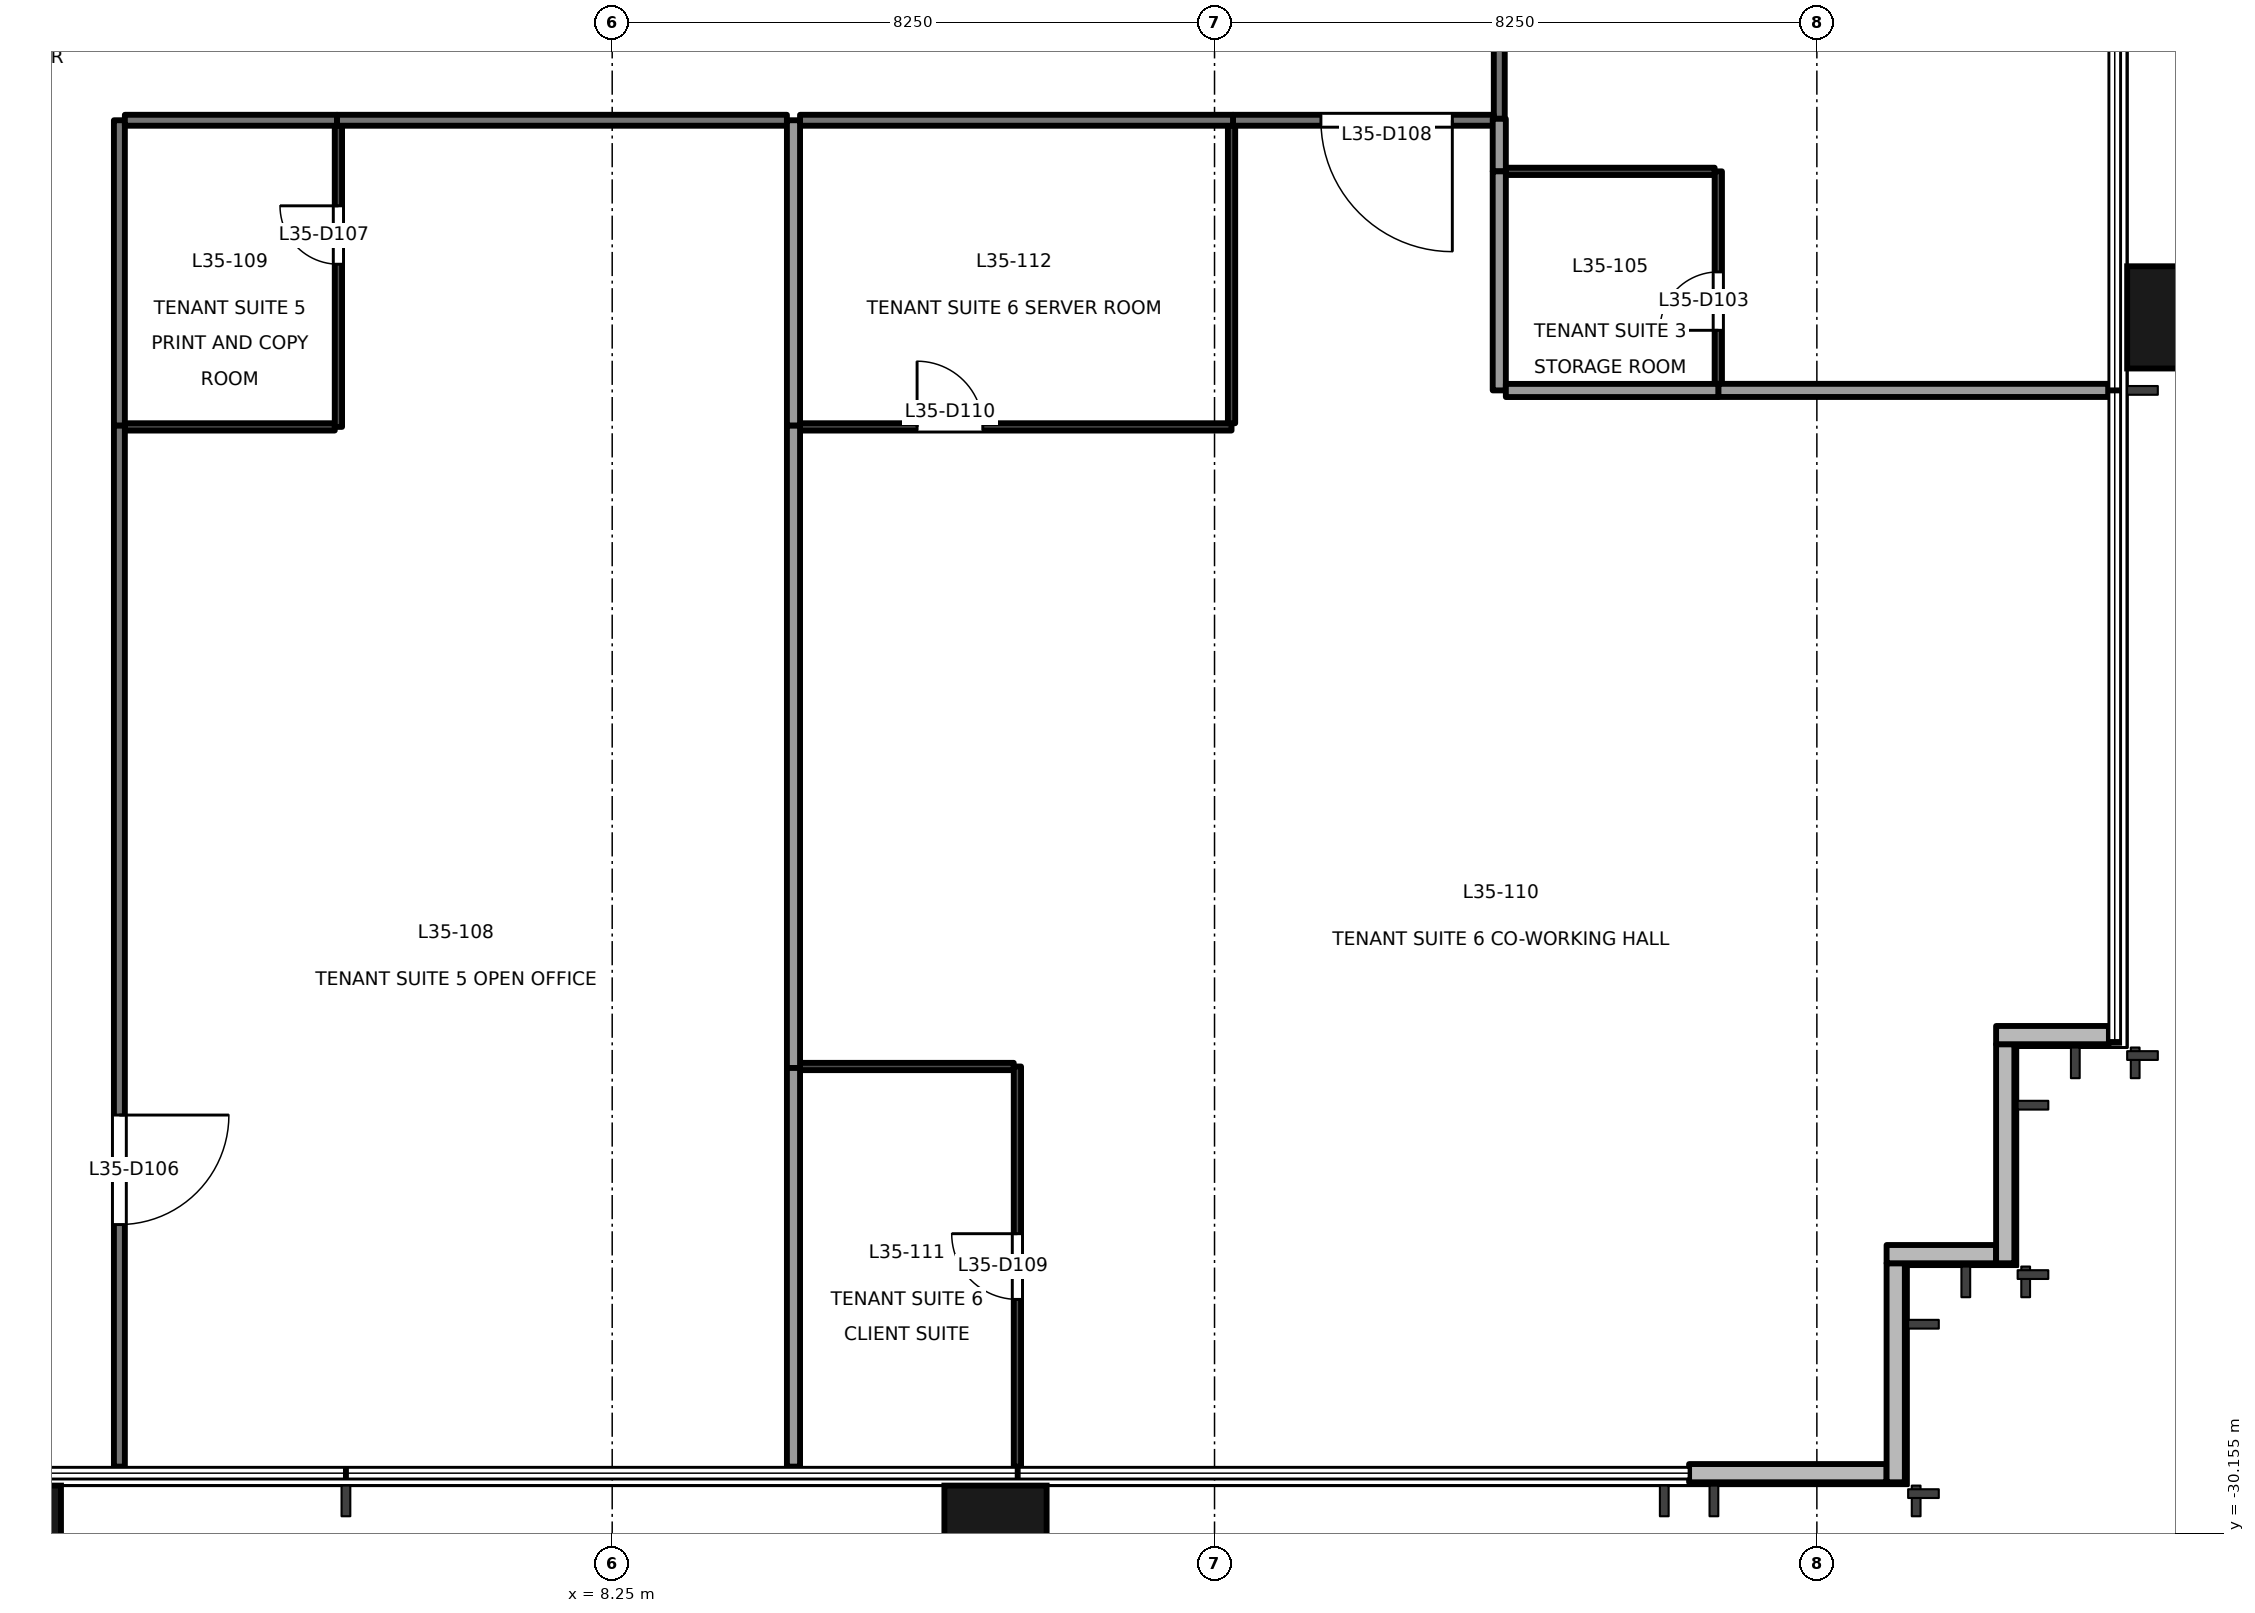
"""IFC4 building model, lengths in metres.
Left out: names, types, materials, properties, quantities, classifications, styles, units other than length and angle.
Written with IfcOpenShell. Run it as: python <this file> out.ifc"""

import sys

from ifc_helpers import new_model, si_unit, direction, frame, frame_2d, origin, origin_2d, place, context, subcontext, project, spatial, rectangle, extrude, element, fill, save


model = new_model("IFC4")
c1 = context("Model", 3, precision=1e-05, world=origin(), true_north=direction((0.0, 1.0)))
c2 = subcontext(c1, "Body", "Model", "MODEL_VIEW")
j1 = project(units=[si_unit("LENGTHUNIT", "METRE"), si_unit("PLANEANGLEUNIT", "RADIAN")], contexts=[c1])
p1 = place(None, origin())
s1 = spatial("IfcSite", under=j1, at=p1, CompositionType="ELEMENT")
p2 = place(p1, origin())
s2 = spatial("IfcBuilding", under=s1, at=p2, CompositionType="ELEMENT")
p3 = place(p2, frame((0.0, 0.0, 154.1)))
s3 = spatial("IfcBuildingStorey", under=s2, at=p3, CompositionType="ELEMENT", Elevation=154.1)
for number, where, z_axis, x_axis in (
    (1, (0.0, -30.4, -0.2), (0.0, 0.0, 1.0), (1.0, 0.0, 0.0)),
    (2, (13.5, -30.4, -0.2), (0.0, 0.0, 1.0), (1.0, 0.0, 0.0)),
    (3, (29.9, -13.5, -0.2), (0.0, 0.0, 1.0), (0.0, 1.0, 0.0)),
):
    element("IfcColumn", number, at=place(p3, frame(where, z_axis=z_axis, x_axis=x_axis)), inside=s3, PredefinedType="COLUMN", context=c2, shape_type="SweptSolid", body=[
        extrude(rectangle(XDim=1.4, YDim=1.8, at=origin_2d()), origin(), (0.0, 0.0, 1.0), 4.0),
    ])
p4 = place(p3, frame((23.0, -29.33, 0.0), z_axis=(0.0, 0.0, 1.0), x_axis=(1.0, 0.0, 0.0)))
e4 = element("IfcWall", 4, at=p4, inside=s3, PredefinedType="SOLIDWALL", context=c2, shape_type="SweptSolid", body=[
    extrude(rectangle(XDim=2.705, YDim=0.25, at=frame_2d((1.353, 0.0))), origin(), (0.0, 0.0, 1.0), 3.8),
])
p5 = place(p3, frame((25.83, -29.455, 0.0), z_axis=(0.0, 0.0, 1.0), x_axis=(0.0, 1.0, 0.0)))
e5 = element("IfcWall", 5, at=p5, inside=s3, PredefinedType="SOLIDWALL", context=c2, shape_type="SweptSolid", body=[
    extrude(rectangle(XDim=3.0, YDim=0.25, at=frame_2d((1.5, 0.0))), origin(), (0.0, 0.0, 1.0), 3.8),
])
p6 = place(p3, frame((25.705, -26.33, 0.0), z_axis=(0.0, 0.0, 1.0), x_axis=(1.0, 0.0, 0.0)))
e6 = element("IfcWall", 6, at=p6, inside=s3, PredefinedType="SOLIDWALL", context=c2, shape_type="SweptSolid", body=[
    extrude(rectangle(XDim=1.5, YDim=0.25, at=frame_2d((0.75, 0.0))), origin(), (0.0, 0.0, 1.0), 3.8),
])
p7 = place(p3, frame((27.33, -26.455, 0.0), z_axis=(0.0, 0.0, 1.0), x_axis=(0.0, 1.0, 0.0)))
e7 = element("IfcWall", 7, at=p7, inside=s3, PredefinedType="SOLIDWALL", context=c2, shape_type="SweptSolid", body=[
    extrude(rectangle(XDim=3.0, YDim=0.25, at=frame_2d((1.5, 0.0))), origin(), (0.0, 0.0, 1.0), 3.8),
])
p8 = place(p3, frame((27.205, -23.33, 0.0), z_axis=(0.0, 0.0, 1.0), x_axis=(1.0, 0.0, 0.0)))
e8 = element("IfcWall", 8, at=p8, inside=s3, PredefinedType="SOLIDWALL", context=c2, shape_type="SweptSolid", body=[
    extrude(rectangle(XDim=1.545, YDim=0.25, at=frame_2d((0.772, 0.0))), origin(), (0.0, 0.0, 1.0), 3.8),
])
p9 = place(p3, frame((20.4, -5.59, 0.0), z_axis=(0.0, 0.0, 1.0), x_axis=(0.0, -1.0, 0.0)))
e9 = element("IfcWall", 9, at=p9, inside=s3, PredefinedType="PARTITIONING", context=c2, shape_type="SweptSolid", body=[
    extrude(rectangle(XDim=5.19, YDim=0.15, at=frame_2d((2.595, 0.0))), origin(), (0.0, 0.0, 1.0), 3.8),
])
p10 = place(p9, frame((1.198, 0.0, 0.0)))
e10 = element("IfcOpeningElement", 10, at=p10, cuts=e9, PredefinedType="OPENING", context=c2, shape_type="SweptSolid", body=[
    extrude(rectangle(XDim=0.9, YDim=2.1, at=frame_2d((0.45, 1.05))), frame((0.0, 0.085, 0.0), z_axis=(0.0, -1.0, 0.0), x_axis=(1.0, 0.0, 0.0)), (0.0, 0.0, 1.0), 0.171),
])
p11 = place(p3, frame((1.5, -14.98, 0.0), z_axis=(0.0, 0.0, 1.0), x_axis=(0.0, -1.0, 0.0)))
e11 = element("IfcWall", 11, at=p11, inside=s3, PredefinedType="PARTITIONING", context=c2, shape_type="SweptSolid", body=[
    extrude(rectangle(XDim=14.26, YDim=0.15, at=frame_2d((7.13, 0.0))), origin(), (0.0, 0.0, 1.0), 3.8),
])
p12 = place(p11, frame((9.445, 0.0, 0.0)))
e12 = element("IfcOpeningElement", 12, at=p12, cuts=e11, PredefinedType="OPENING", context=c2, shape_type="SweptSolid", body=[
    extrude(rectangle(XDim=1.5, YDim=2.1, at=frame_2d((0.75, 1.05))), frame((0.0, 0.085, 0.0), z_axis=(0.0, -1.0, 0.0), x_axis=(1.0, 0.0, 0.0)), (0.0, 0.0, 1.0), 0.171),
])
p13 = place(p3, frame((10.643, -10.8, 0.0), z_axis=(0.0, 0.0, 1.0), x_axis=(-1.0, 0.0, 0.0)))
e13 = element("IfcWall", 13, at=p13, inside=s3, PredefinedType="PARTITIONING", context=c2, shape_type="SweptSolid", body=[
    extrude(rectangle(XDim=6.163, YDim=0.15, at=frame_2d((3.082, 0.0))), origin(), (0.0, 0.0, 1.0), 2.9),
])
p14 = place(p3, frame((1.5, -10.8, 0.0), z_axis=(0.0, 0.0, 1.0), x_axis=(0.0, -1.0, 0.0)))
e14 = element("IfcWall", 14, at=p14, inside=s3, PredefinedType="PARTITIONING", context=c2, shape_type="SweptSolid", body=[
    extrude(rectangle(XDim=4.18, YDim=0.15, at=frame_2d((2.09, 0.0))), origin(), (0.0, 0.0, 1.0), 3.8),
])
p15 = place(p3, frame((4.48, -10.8, 0.0), z_axis=(0.0, 0.0, 1.0), x_axis=(-1.0, 0.0, 0.0)))
e15 = element("IfcWall", 15, at=p15, inside=s3, PredefinedType="PARTITIONING", context=c2, shape_type="SweptSolid", body=[
    extrude(rectangle(XDim=2.905, YDim=0.15, at=frame_2d((1.453, 0.0))), origin(), (0.0, 0.0, 1.0), 2.9),
])
p16 = place(p3, frame((20.325, -10.8, 0.0), z_axis=(0.0, 0.0, 1.0), x_axis=(-1.0, 0.0, 0.0)))
e16 = element("IfcWall", 16, at=p16, inside=s3, PredefinedType="PARTITIONING", context=c2, shape_type="SweptSolid", body=[
    extrude(rectangle(XDim=3.572, YDim=0.15, at=frame_2d((1.786, 0.0))), origin(), (0.0, 0.0, 1.0), 3.8),
])
p17 = place(p16, frame((0.568, 0.0, 0.0)))
e17 = element("IfcOpeningElement", 17, at=p17, cuts=e16, PredefinedType="OPENING", context=c2, shape_type="SweptSolid", body=[
    extrude(rectangle(XDim=1.8, YDim=2.1, at=frame_2d((0.9, 1.05))), frame((0.0, 0.085, 0.0), z_axis=(0.0, -1.0, 0.0), x_axis=(1.0, 0.0, 0.0)), (0.0, 0.0, 1.0), 0.171),
])
p18 = place(p3, frame((16.753, -10.8, 0.0), z_axis=(0.0, 0.0, 1.0), x_axis=(-1.0, 0.0, 0.0)))
e18 = element("IfcWall", 18, at=p18, inside=s3, PredefinedType="PARTITIONING", context=c2, shape_type="SweptSolid", body=[
    extrude(rectangle(XDim=5.93, YDim=0.15, at=frame_2d((2.965, 0.0))), origin(), (0.0, 0.0, 1.0), 2.9),
])
p19 = place(p3, frame((23.35, -11.5, 0.0), z_axis=(0.0, 0.0, 1.0), x_axis=(-1.0, 0.0, 0.0)))
e19 = element("IfcWall", 19, at=p19, inside=s3, PredefinedType="PARTITIONING", context=c2, shape_type="SweptSolid", body=[
    extrude(rectangle(XDim=2.86, YDim=0.1, at=frame_2d((1.43, 0.0))), origin(), (0.0, 0.0, 1.0), 3.8),
])
p20 = place(p3, frame((23.4, -14.41, 0.0), z_axis=(0.0, 0.0, 1.0), x_axis=(0.0, 1.0, 0.0)))
e20 = element("IfcWall", 20, at=p20, inside=s3, PredefinedType="PARTITIONING", context=c2, shape_type="SweptSolid", body=[
    extrude(rectangle(XDim=2.91, YDim=0.1, at=frame_2d((1.455, 0.0))), origin(), (0.0, 0.0, 1.0), 3.8),
])
p21 = place(p20, frame((0.733, 0.0, 0.0)))
e21 = element("IfcOpeningElement", 21, at=p21, cuts=e20, PredefinedType="OPENING", context=c2, shape_type="SweptSolid", body=[
    extrude(rectangle(XDim=0.8, YDim=2.1, at=frame_2d((0.4, 1.05))), frame((0.0, 0.061, 0.0), z_axis=(0.0, -1.0, 0.0), x_axis=(1.0, 0.0, 0.0)), (0.0, 0.0, 1.0), 0.121),
])
p22 = place(p3, frame((20.4, -11.5, 0.0), z_axis=(0.0, 0.0, 1.0), x_axis=(0.0, 1.0, 0.0)))
e22 = element("IfcWall", 22, at=p22, inside=s3, PredefinedType="PARTITIONING", context=c2, shape_type="SweptSolid", body=[
    extrude(rectangle(XDim=0.72, YDim=0.18, at=frame_2d((0.36, 0.0))), origin(), (0.0, 0.0, 1.0), 3.8),
])
p23 = place(p3, frame((28.74, -14.5, 0.0), z_axis=(0.0, 0.0, 1.0), x_axis=(-1.0, 0.0, 0.0)))
e23 = element("IfcWall", 23, at=p23, inside=s3, PredefinedType="PARTITIONING", context=c2, shape_type="SweptSolid", body=[
    extrude(rectangle(XDim=5.34, YDim=0.18, at=frame_2d((2.67, 0.0))), origin(), (0.0, 0.0, 1.0), 3.8),
])
p24 = place(p3, frame((20.4, -14.5, 0.0), z_axis=(0.0, 0.0, 1.0), x_axis=(0.0, 1.0, 0.0)))
e24 = element("IfcWall", 24, at=p24, inside=s3, PredefinedType="PARTITIONING", context=c2, shape_type="SweptSolid", body=[
    extrude(rectangle(XDim=3.0, YDim=0.18, at=frame_2d((1.5, 0.0))), origin(), (0.0, 0.0, 1.0), 3.8),
])
p25 = place(p3, frame((23.4, -14.501, 0.0), z_axis=(0.0, 0.0, 1.0), x_axis=(-1.0, 0.0, 0.0)))
e25 = element("IfcWall", 25, at=p25, inside=s3, PredefinedType="PARTITIONING", context=c2, shape_type="SweptSolid", body=[
    extrude(rectangle(XDim=2.91, YDim=0.18, at=frame_2d((1.455, 0.0))), origin(), (0.0, 0.0, 1.0), 3.8),
])
p26 = place(p3, frame((1.575, -15.0, 0.0), z_axis=(0.0, 0.0, 1.0), x_axis=(1.0, 0.0, 0.0)))
e26 = element("IfcWall", 26, at=p26, inside=s3, PredefinedType="PARTITIONING", context=c2, shape_type="SweptSolid", body=[
    extrude(rectangle(XDim=2.875, YDim=0.1, at=frame_2d((1.438, 0.0))), origin(), (0.0, 0.0, 1.0), 2.9),
])
p27 = place(p3, frame((4.5, -15.0, 0.0), z_axis=(0.0, 0.0, 1.0), x_axis=(0.0, 1.0, 0.0)))
e27 = element("IfcWall", 27, at=p27, inside=s3, PredefinedType="PARTITIONING", context=c2, shape_type="SweptSolid", body=[
    extrude(rectangle(XDim=4.125, YDim=0.1, at=frame_2d((2.062, 0.0))), origin(), (0.0, 0.0, 1.0), 2.9),
])
p28 = place(p27, frame((2.228, 0.0, 0.0)))
e28 = element("IfcOpeningElement", 28, at=p28, cuts=e27, PredefinedType="OPENING", context=c2, shape_type="SweptSolid", body=[
    extrude(rectangle(XDim=0.8, YDim=2.1, at=frame_2d((0.4, 1.05))), frame((0.0, 0.061, 0.0), z_axis=(0.0, -1.0, 0.0), x_axis=(1.0, 0.0, 0.0)), (0.0, 0.0, 1.0), 0.121),
])
p29 = place(p3, frame((10.733, -14.98, 0.0), z_axis=(0.0, 0.0, 1.0), x_axis=(0.0, -1.0, 0.0)))
e29 = element("IfcWall", 29, at=p29, inside=s3, PredefinedType="PARTITIONING", context=c2, shape_type="SweptSolid", body=[
    extrude(rectangle(XDim=8.8, YDim=0.18, at=frame_2d((4.4, 0.0))), origin(), (0.0, 0.0, 1.0), 3.8),
])
p30 = place(p3, frame((10.733, -23.78, 0.0), z_axis=(0.0, 0.0, 1.0), x_axis=(0.0, -1.0, 0.0)))
e30 = element("IfcWall", 30, at=p30, inside=s3, PredefinedType="PARTITIONING", context=c2, shape_type="SweptSolid", body=[
    extrude(rectangle(XDim=5.46, YDim=0.18, at=frame_2d((2.73, 0.0))), origin(), (0.0, 0.0, 1.0), 3.8),
])
p31 = place(p3, frame((10.733, -10.8, 0.0), z_axis=(0.0, 0.0, 1.0), x_axis=(0.0, -1.0, 0.0)))
e31 = element("IfcWall", 31, at=p31, inside=s3, PredefinedType="PARTITIONING", context=c2, shape_type="SweptSolid", body=[
    extrude(rectangle(XDim=4.18, YDim=0.18, at=frame_2d((2.09, 0.0))), origin(), (0.0, 0.0, 1.0), 3.8),
])
p32 = place(p3, frame((13.75, -23.76, 0.0), z_axis=(0.0, 0.0, 1.0), x_axis=(-1.0, 0.0, 0.0)))
e32 = element("IfcWall", 32, at=p32, inside=s3, PredefinedType="PARTITIONING", context=c2, shape_type="SweptSolid", body=[
    extrude(rectangle(XDim=2.927, YDim=0.1, at=frame_2d((1.463, 0.0))), origin(), (0.0, 0.0, 1.0), 2.9),
])
p33 = place(p3, frame((13.8, -29.24, 0.0), z_axis=(0.0, 0.0, 1.0), x_axis=(0.0, 1.0, 0.0)))
e33 = element("IfcWall", 33, at=p33, inside=s3, PredefinedType="PARTITIONING", context=c2, shape_type="SweptSolid", body=[
    extrude(rectangle(XDim=5.48, YDim=0.1, at=frame_2d((2.74, 0.0))), origin(), (0.0, 0.0, 1.0), 3.8),
])
p34 = place(p33, frame((2.29, 0.0, 0.0)))
e34 = element("IfcOpeningElement", 34, at=p34, cuts=e33, PredefinedType="OPENING", context=c2, shape_type="SweptSolid", body=[
    extrude(rectangle(XDim=0.9, YDim=2.1, at=frame_2d((0.45, 1.05))), frame((0.0, 0.061, 0.0), z_axis=(0.0, -1.0, 0.0), x_axis=(1.0, 0.0, 0.0)), (0.0, 0.0, 1.0), 0.121),
])
p35 = place(p3, frame((10.823, -15.0, 0.0), z_axis=(0.0, 0.0, 1.0), x_axis=(1.0, 0.0, 0.0)))
e35 = element("IfcWall", 35, at=p35, inside=s3, PredefinedType="PARTITIONING", context=c2, shape_type="SweptSolid", body=[
    extrude(rectangle(XDim=5.91, YDim=0.1, at=frame_2d((2.955, 0.0))), origin(), (0.0, 0.0, 1.0), 2.9),
])
p36 = place(p35, frame((1.603, 0.0, 0.0)))
e36 = element("IfcOpeningElement", 36, at=p36, cuts=e35, PredefinedType="OPENING", context=c2, shape_type="SweptSolid", body=[
    extrude(rectangle(XDim=0.9, YDim=2.1, at=frame_2d((0.45, 1.05))), frame((0.0, 0.061, 0.0), z_axis=(0.0, -1.0, 0.0), x_axis=(1.0, 0.0, 0.0)), (0.0, 0.0, 1.0), 0.121),
])
p37 = place(p3, frame((16.733, -14.95, 0.0), z_axis=(0.0, 0.0, 1.0), x_axis=(0.0, 1.0, 0.0)))
e37 = element("IfcWall", 37, at=p37, inside=s3, PredefinedType="PARTITIONING", context=c2, shape_type="SweptSolid", body=[
    extrude(rectangle(XDim=4.075, YDim=0.1, at=frame_2d((2.038, 0.0))), origin(), (0.0, 0.0, 1.0), 3.8),
])
p38 = place(p21, origin())
e38 = element("IfcDoor", 38, at=p38, inside=s3, OperationType="SINGLE_SWING_LEFT", PredefinedType="DOOR", context=c2, shape_type="SweptSolid", body=[
    extrude(rectangle(XDim=0.8, YDim=2.1, at=frame_2d((0.4, 1.05))), frame((0.0, 0.025, 0.0), z_axis=(0.0, -1.0, 0.0), x_axis=(1.0, 0.0, 0.0)), (0.0, 0.0, 1.0), 0.05),
])
fill(e21, e38)
p39 = place(p12, origin())
e39 = element("IfcDoor", 39, at=p39, inside=s3, OperationType="DOUBLE_DOOR_SINGLE_SWING", PredefinedType="DOOR", context=c2, shape_type="SweptSolid", body=[
    extrude(rectangle(XDim=1.5, YDim=2.1, at=frame_2d((0.75, 1.05))), frame((0.0, 0.025, 0.0), z_axis=(0.0, -1.0, 0.0), x_axis=(1.0, 0.0, 0.0)), (0.0, 0.0, 1.0), 0.05),
])
fill(e12, e39)
p40 = place(p28, origin())
e40 = element("IfcDoor", 40, at=p40, inside=s3, OperationType="SINGLE_SWING_RIGHT", PredefinedType="DOOR", context=c2, shape_type="SweptSolid", body=[
    extrude(rectangle(XDim=0.8, YDim=2.1, at=frame_2d((0.4, 1.05))), frame((0.0, 0.025, 0.0), z_axis=(0.0, -1.0, 0.0), x_axis=(1.0, 0.0, 0.0)), (0.0, 0.0, 1.0), 0.05),
])
fill(e28, e40)
p41 = place(p17, origin())
e41 = element("IfcDoor", 41, at=p41, inside=s3, OperationType="DOUBLE_DOOR_SINGLE_SWING", PredefinedType="DOOR", context=c2, shape_type="SweptSolid", body=[
    extrude(rectangle(XDim=1.8, YDim=2.1, at=frame_2d((0.9, 1.05))), frame((0.0, 0.025, 0.0), z_axis=(0.0, -1.0, 0.0), x_axis=(1.0, 0.0, 0.0)), (0.0, 0.0, 1.0), 0.05),
])
fill(e17, e41)
p42 = place(p34, origin())
e42 = element("IfcDoor", 42, at=p42, inside=s3, OperationType="SINGLE_SWING_RIGHT", PredefinedType="DOOR", context=c2, shape_type="SweptSolid", body=[
    extrude(rectangle(XDim=0.9, YDim=2.1, at=frame_2d((0.45, 1.05))), frame((0.0, 0.025, 0.0), z_axis=(0.0, -1.0, 0.0), x_axis=(1.0, 0.0, 0.0)), (0.0, 0.0, 1.0), 0.05),
])
fill(e34, e42)
p43 = place(p36, origin())
e43 = element("IfcDoor", 43, at=p43, inside=s3, OperationType="SINGLE_SWING_LEFT", PredefinedType="DOOR", context=c2, shape_type="SweptSolid", body=[
    extrude(rectangle(XDim=0.9, YDim=2.1, at=frame_2d((0.45, 1.05))), frame((0.0, 0.025, 0.0), z_axis=(0.0, -1.0, 0.0), x_axis=(1.0, 0.0, 0.0)), (0.0, 0.0, 1.0), 0.05),
])
fill(e36, e43)
save(model, sys.argv[1])
